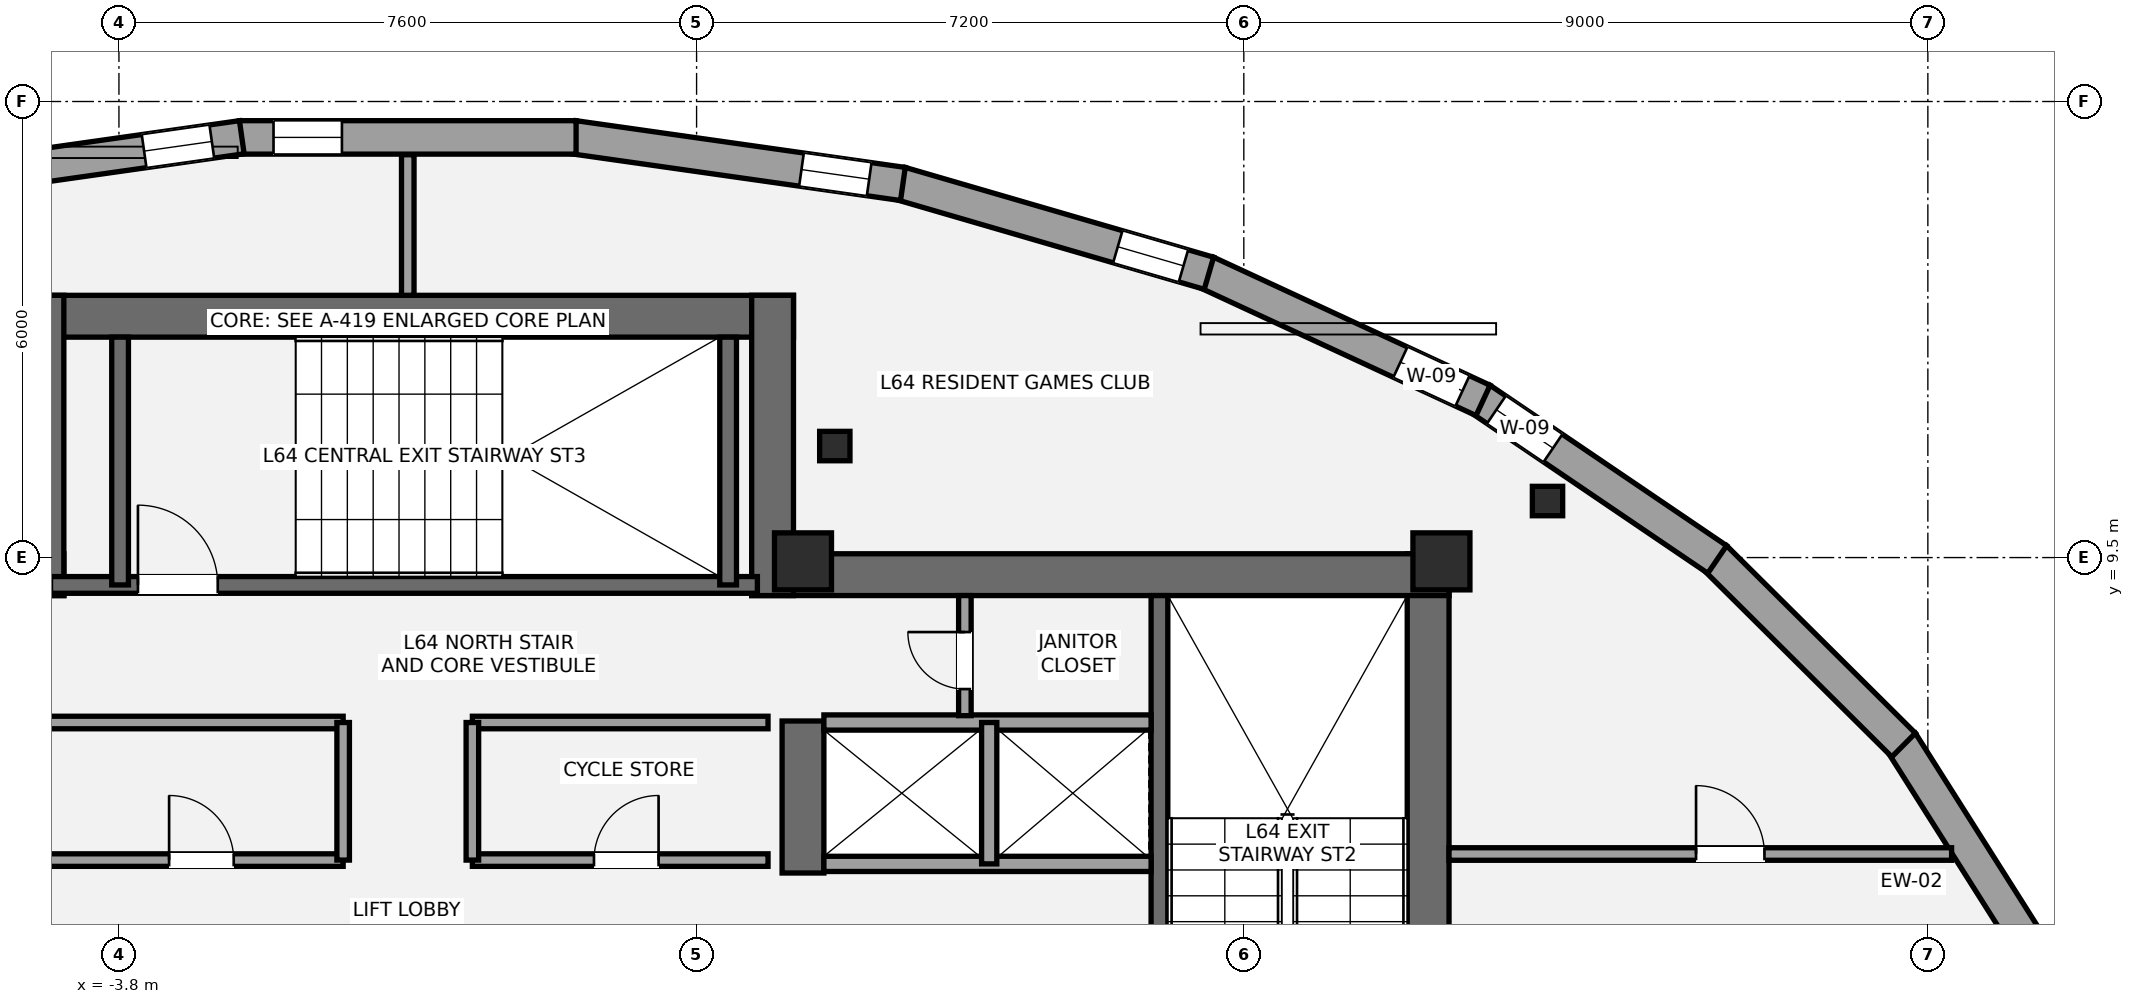
"""IFC4 building model, lengths in metres.
Left out: names, types, materials, properties, quantities, classifications, styles, units other than length and angle.
Written with IfcOpenShell. Run it as: python <this file> out.ifc"""

import sys

from ifc_helpers import new_model, si_unit, direction, frame, frame_2d, origin, origin_2d, place, context, subcontext, project, spatial, rectangle, i_section, extrude, element, fill, save


model = new_model("IFC4")
c1 = context("Model", 3, precision=1e-05, world=origin(), true_north=direction((0.0, 1.0)))
c2 = subcontext(c1, "Body", "Model", "MODEL_VIEW")
j1 = project(units=[si_unit("LENGTHUNIT", "METRE"), si_unit("PLANEANGLEUNIT", "RADIAN")], contexts=[c1])
p1 = place(None, origin())
s1 = spatial("IfcSite", under=j1, at=p1, CompositionType="ELEMENT")
p2 = place(p1, origin())
s2 = spatial("IfcBuilding", under=s1, at=p2, CompositionType="ELEMENT")
p3 = place(p2, frame((0.0, 0.0, 228.9)))
s3 = spatial("IfcBuildingStorey", under=s2, at=p3, CompositionType="ELEMENT", Elevation=228.9)
p4 = place(p3, frame((-13.7, 9.275, 0.0), z_axis=(0.0, 0.0, 1.0), x_axis=(1.0, 0.0, 0.0)))
e1 = element("IfcWall", 1, at=p4, inside=s3, PredefinedType="SHEAR", context=c2, shape_type="SweptSolid", body=[
    extrude(rectangle(XDim=9.175, YDim=0.55, at=frame_2d((4.587, 0.0))), origin(), (0.0, 0.0, 1.0), 3.15),
])
p5 = place(p3, frame((13.425, 1.3, 0.0), z_axis=(0.0, 0.0, 1.0), x_axis=(0.0, 1.0, 0.0)))
e2 = element("IfcWall", 2, at=p5, inside=s3, PredefinedType="SHEAR", context=c2, shape_type="SweptSolid", body=[
    extrude(rectangle(XDim=8.25, YDim=0.55, at=frame_2d((4.125, 0.0))), origin(), (0.0, 0.0, 1.0), 3.15),
])
p6 = place(p3, frame((4.525, 9.275, 0.0), z_axis=(0.0, 0.0, 1.0), x_axis=(1.0, 0.0, 0.0)))
e3 = element("IfcWall", 3, at=p6, inside=s3, PredefinedType="SHEAR", context=c2, shape_type="SweptSolid", body=[
    extrude(rectangle(XDim=9.175, YDim=0.55, at=frame_2d((4.587, 0.0))), origin(), (0.0, 0.0, 1.0), 3.15),
])
p7 = place(p3, frame((5.2, 5.35, 0.0), z_axis=(0.0, 0.0, 1.0), x_axis=(0.0, 1.0, 0.0)))
e4 = element("IfcWall", 4, at=p7, inside=s3, PredefinedType="SHEAR", context=c2, shape_type="SweptSolid", body=[
    extrude(rectangle(XDim=2.0, YDim=0.55, at=frame_2d((1.0, 0.0))), origin(), (0.0, 0.0, 1.0), 3.15),
])
p8 = place(p3, frame((9.89, 1.85, 0.0), z_axis=(0.0, 0.0, 1.0), x_axis=(0.0, 1.0, 0.0)))
e5 = element("IfcWall", 5, at=p8, inside=s3, PredefinedType="SHEAR", context=c2, shape_type="SweptSolid", body=[
    extrude(rectangle(XDim=7.15, YDim=0.22, at=frame_2d((3.575, 0.0))), origin(), (0.0, 0.0, 1.0), 3.15),
])
p9 = place(p3, frame((-5.075, 12.675, 0.0), z_axis=(0.0, 0.0, 1.0), x_axis=(1.0, 0.0, 0.0)))
e6 = element("IfcWall", 6, at=p9, inside=s3, PredefinedType="SHEAR", context=c2, shape_type="SweptSolid", body=[
    extrude(rectangle(XDim=10.15, YDim=0.55, at=frame_2d((5.075, 0.0))), origin(), (0.0, 0.0, 1.0), 3.15),
])
for number, where, z_axis, x_axis in (
    (7, (-4.8, 9.0, 0.0), (0.0, 0.0, 1.0), (0.0, 1.0, 0.0)),
    (8, (4.8, 9.0, 0.0), (0.0, 0.0, 1.0), (0.0, 1.0, 0.0)),
):
    element("IfcWall", number, at=place(p3, frame(where, z_axis=z_axis, x_axis=x_axis)), inside=s3, PredefinedType="SHEAR", context=c2, shape_type="SweptSolid", body=[
        extrude(rectangle(XDim=3.95, YDim=0.55, at=frame_2d((1.975, 0.0))), origin(), (0.0, 0.0, 1.0), 3.15),
    ])
p10 = place(p3, frame((-4.7, 9.14, 0.0), z_axis=(0.0, 0.0, 1.0), x_axis=(1.0, 0.0, 0.0)))
e9 = element("IfcWall", 9, at=p10, inside=s3, PredefinedType="SHEAR", context=c2, shape_type="SweptSolid", body=[
    extrude(rectangle(XDim=9.3, YDim=0.22, at=frame_2d((4.65, 0.0))), origin(), (0.0, 0.0, 1.0), 3.15),
])
p11 = place(p10, frame((1.15, 0.0, 0.0)))
e10 = element("IfcOpeningElement", 10, at=p11, cuts=e9, PredefinedType="OPENING", context=c2, shape_type="SweptSolid", body=[
    extrude(rectangle(XDim=1.05, YDim=2.15, at=frame_2d((0.525, 1.075))), frame((0.0, 0.12, 0.0), z_axis=(0.0, -1.0, 0.0), x_axis=(1.0, 0.0, 0.0)), (0.0, 0.0, 1.0), 0.24),
])
for number, where, z_axis, x_axis in (
    (11, (-3.785, 9.14, 0.0), (0.0, 0.0, 1.0), (0.0, 1.0, 0.0)),
    (12, (4.215, 9.14, 0.0), (0.0, 0.0, 1.0), (0.0, 1.0, 0.0)),
):
    element("IfcWall", number, at=place(p3, frame(where, z_axis=z_axis, x_axis=x_axis)), inside=s3, PredefinedType="SHEAR", context=c2, shape_type="SweptSolid", body=[
        extrude(rectangle(XDim=3.26, YDim=0.22, at=frame_2d((1.63, 0.0))), origin(), (0.0, 0.0, 1.0), 3.15),
    ])
for number, where, z_axis, x_axis in (
    (13, (5.2, 9.45, 0.0), (0.0, 0.0, 1.0), (1.0, 0.0, 0.0)),
    (14, (13.6, 9.45, 0.0), (0.0, 0.0, 1.0), (1.0, 0.0, 0.0)),
):
    element("IfcColumn", number, at=place(p3, frame(where, z_axis=z_axis, x_axis=x_axis)), inside=s3, PredefinedType="PILASTER", context=c2, shape_type="SweptSolid", body=[
        extrude(rectangle(XDim=0.75, YDim=0.75, at=origin_2d()), origin(), (0.0, 0.0, 1.0), 3.15),
    ])
for number, where, z_axis, x_axis in (
    (15, (14.996, 10.244, 0.0), (0.0, 0.0, 1.0), (1.0, 0.0, 0.0)),
    (16, (5.619, 10.967, 0.0), (0.0, 0.0, 1.0), (1.0, 0.0, 0.0)),
):
    element("IfcColumn", number, at=place(p3, frame(where, z_axis=z_axis, x_axis=x_axis)), inside=s3, PredefinedType="COLUMN", context=c2, shape_type="SweptSolid", body=[
        extrude(i_section(OverallWidth=0.399, OverallDepth=0.387, WebThickness=0.021, FlangeThickness=0.033, at=origin_2d()), origin(), (0.0, 0.0, 1.0), 3.15),
    ])
p12 = place(p3, frame((19.65, 7.073, 0.0), z_axis=(0.0, 0.0, 1.0), x_axis=(0.53485586517, -0.844943313775, 0.0)))
e17 = element("IfcWall", 17, at=p12, inside=s3, PredefinedType="STANDARD", context=c2, shape_type="SweptSolid", body=[
    extrude(rectangle(XDim=3.256, YDim=0.44, at=frame_2d((1.628, 0.0))), origin(), (0.0, 0.0, 1.0), 2.336),
])
p13 = place(p3, frame((17.197, 9.501, 0.0), z_axis=(0.0, 0.0, 1.0), x_axis=(0.709543258305, -0.704661879623, 0.0)))
e18 = element("IfcWall", 18, at=p13, inside=s3, PredefinedType="STANDARD", context=c2, shape_type="SweptSolid", body=[
    extrude(rectangle(XDim=3.501, YDim=0.44, at=frame_2d((1.75, 0.0))), origin(), (0.0, 0.0, 1.0), 2.336),
])
p14 = place(p3, frame((14.117, 11.585, 0.0), z_axis=(0.0, 0.0, 1.0), x_axis=(0.827638454008, -0.561261605178, 0.0)))
e19 = element("IfcWall", 19, at=p14, inside=s3, PredefinedType="STANDARD", context=c2, shape_type="SweptSolid", body=[
    extrude(rectangle(XDim=3.76, YDim=0.44, at=frame_2d((1.88, 0.0))), origin(), (0.0, 0.0, 1.0), 2.336),
])
p15 = place(p14, frame((0.249, 0.0, 0.42)))
e20 = element("IfcOpeningElement", 20, at=p15, cuts=e19, PredefinedType="OPENING", context=c2, shape_type="SweptSolid", body=[
    extrude(rectangle(XDim=0.9, YDim=1.35, at=frame_2d((0.45, 0.675))), frame((0.0, 0.23, 0.0), z_axis=(0.0, -1.0, 0.0), x_axis=(1.0, 0.0, 0.0)), (0.0, 0.0, 1.0), 0.46),
])
p16 = place(p3, frame((10.51, 13.252, 0.0), z_axis=(0.0, 0.0, 1.0), x_axis=(0.907400682183, -0.420266584412, 0.0)))
e21 = element("IfcWall", 21, at=p16, inside=s3, PredefinedType="STANDARD", context=c2, shape_type="SweptSolid", body=[
    extrude(rectangle(XDim=4.009, YDim=0.44, at=frame_2d((2.004, 0.0))), origin(), (0.0, 0.0, 1.0), 2.336),
])
p17 = place(p16, frame((2.81, 0.0, 0.58)))
e22 = element("IfcOpeningElement", 22, at=p17, cuts=e21, PredefinedType="OPENING", context=c2, shape_type="SweptSolid", body=[
    extrude(rectangle(XDim=0.9, YDim=1.35, at=frame_2d((0.45, 0.675))), frame((0.0, 0.23, 0.0), z_axis=(0.0, -1.0, 0.0), x_axis=(1.0, 0.0, 0.0)), (0.0, 0.0, 1.0), 0.46),
])
p18 = place(p3, frame((6.484, 14.422, 0.0), z_axis=(0.0, 0.0, 1.0), x_axis=(0.960138362531, -0.279525177393, 0.0)))
e23 = element("IfcWall", 23, at=p18, inside=s3, PredefinedType="STANDARD", context=c2, shape_type="SweptSolid", body=[
    extrude(rectangle(XDim=4.226, YDim=0.44, at=frame_2d((2.113, 0.0))), origin(), (0.0, 0.0, 1.0), 2.336),
])
p19 = place(p18, frame((2.977, 0.0, 0.58)))
e24 = element("IfcOpeningElement", 24, at=p19, cuts=e23, PredefinedType="OPENING", context=c2, shape_type="SweptSolid", body=[
    extrude(rectangle(XDim=0.9, YDim=1.35, at=frame_2d((0.45, 0.675))), frame((0.0, 0.23, 0.0), z_axis=(0.0, -1.0, 0.0), x_axis=(1.0, 0.0, 0.0)), (0.0, 0.0, 1.0), 0.46),
])
p20 = place(p3, frame((2.184, 15.03, 0.0), z_axis=(0.0, 0.0, 1.0), x_axis=(0.990076340622, -0.140530565146, 0.0)))
e25 = element("IfcWall", 25, at=p20, inside=s3, PredefinedType="STANDARD", context=c2, shape_type="SweptSolid", body=[
    extrude(rectangle(XDim=4.375, YDim=0.44, at=frame_2d((2.187, 0.0))), origin(), (0.0, 0.0, 1.0), 2.336),
])
p21 = place(p20, frame((3.027, 0.0, 0.58)))
e26 = element("IfcOpeningElement", 26, at=p21, cuts=e25, PredefinedType="OPENING", context=c2, shape_type="SweptSolid", body=[
    extrude(rectangle(XDim=0.9, YDim=1.35, at=frame_2d((0.45, 0.675))), frame((0.0, 0.23, 0.0), z_axis=(0.0, -1.0, 0.0), x_axis=(1.0, 0.0, 0.0)), (0.0, 0.0, 1.0), 0.46),
])
p22 = place(p3, frame((-2.215, 15.028, 0.0), z_axis=(0.0, 0.0, 1.0), x_axis=(1.0, 0.0, 0.0)))
e27 = element("IfcWall", 27, at=p22, inside=s3, PredefinedType="STANDARD", context=c2, shape_type="SweptSolid", body=[
    extrude(rectangle(XDim=4.429, YDim=0.44, at=frame_2d((2.215, 0.0))), origin(), (0.0, 0.0, 1.0), 2.336),
])
p23 = place(p22, frame((0.448, 0.0, 0.58)))
e28 = element("IfcOpeningElement", 28, at=p23, cuts=e27, PredefinedType="OPENING", context=c2, shape_type="SweptSolid", body=[
    extrude(rectangle(XDim=0.9, YDim=1.35, at=frame_2d((0.45, 0.675))), frame((0.0, 0.23, 0.0), z_axis=(0.0, -1.0, 0.0), x_axis=(1.0, 0.0, 0.0)), (0.0, 0.0, 1.0), 0.46),
])
p24 = place(p3, frame((-6.515, 14.415, 0.0), z_axis=(0.0, 0.0, 1.0), x_axis=(0.990076340622, 0.140530565146, 0.0)))
e29 = element("IfcWall", 29, at=p24, inside=s3, PredefinedType="STANDARD", context=c2, shape_type="SweptSolid", body=[
    extrude(rectangle(XDim=4.375, YDim=0.44, at=frame_2d((2.187, 0.0))), origin(), (0.0, 0.0, 1.0), 2.336),
])
p25 = place(p24, frame((3.076, 0.0, 0.58)))
e30 = element("IfcOpeningElement", 30, at=p25, cuts=e29, PredefinedType="OPENING", context=c2, shape_type="SweptSolid", body=[
    extrude(rectangle(XDim=0.9, YDim=1.35, at=frame_2d((0.45, 0.675))), frame((0.0, 0.23, 0.0), z_axis=(0.0, -1.0, 0.0), x_axis=(1.0, 0.0, 0.0)), (0.0, 0.0, 1.0), 0.46),
])
for number, where, z_axis, x_axis in (
    (31, (5.475, 5.47, 0.0), (0.0, 0.0, 1.0), (1.0, 0.0, 0.0)),
    (32, (5.475, 7.33, 0.0), (0.0, 0.0, 1.0), (1.0, 0.0, 0.0)),
):
    element("IfcWall", number, at=place(p3, frame(where, z_axis=z_axis, x_axis=x_axis)), inside=s3, PredefinedType="SOLIDWALL", context=c2, shape_type="SweptSolid", body=[
        extrude(rectangle(XDim=4.305, YDim=0.2, at=frame_2d((2.152, 0.0))), origin(), (0.0, 0.0, 1.0), 2.97),
    ])
p26 = place(p3, frame((7.65, 5.47, 0.0), z_axis=(0.0, 0.0, 1.0), x_axis=(0.0, 1.0, 0.0)))
e33 = element("IfcWall", 33, at=p26, inside=s3, PredefinedType="SOLIDWALL", context=c2, shape_type="SweptSolid", body=[
    extrude(rectangle(XDim=1.86, YDim=0.2, at=frame_2d((0.93, 0.0))), origin(), (0.0, 0.0, 1.0), 2.97),
])
p27 = place(p3, frame((-4.74, 5.52, 0.0), z_axis=(0.0, 0.0, 1.0), x_axis=(1.0, 0.0, 0.0)))
e34 = element("IfcWall", 34, at=p27, inside=s3, PredefinedType="PARTITIONING", context=c2, shape_type="SweptSolid", body=[
    extrude(rectangle(XDim=3.89, YDim=0.165, at=frame_2d((1.945, 0.0))), origin(), (0.0, 0.0, 1.0), 2.97),
])
p28 = place(p27, frame((1.6, 0.0, 0.0)))
e35 = element("IfcOpeningElement", 35, at=p28, cuts=e34, PredefinedType="OPENING", context=c2, shape_type="SweptSolid", body=[
    extrude(rectangle(XDim=0.85, YDim=2.1, at=frame_2d((0.425, 1.05))), frame((0.0, 0.093, 0.0), z_axis=(0.0, -1.0, 0.0), x_axis=(1.0, 0.0, 0.0)), (0.0, 0.0, 1.0), 0.185),
])
p29 = place(p3, frame((-4.74, 7.33, 0.0), z_axis=(0.0, 0.0, 1.0), x_axis=(1.0, 0.0, 0.0)))
e36 = element("IfcWall", 36, at=p29, inside=s3, PredefinedType="PARTITIONING", context=c2, shape_type="SweptSolid", body=[
    extrude(rectangle(XDim=3.89, YDim=0.165, at=frame_2d((1.945, 0.0))), origin(), (0.0, 0.0, 1.0), 2.97),
])
p30 = place(p3, frame((-0.85, 5.52, 0.0), z_axis=(0.0, 0.0, 1.0), x_axis=(0.0, 1.0, 0.0)))
e37 = element("IfcWall", 37, at=p30, inside=s3, PredefinedType="PARTITIONING", context=c2, shape_type="SweptSolid", body=[
    extrude(rectangle(XDim=1.81, YDim=0.165, at=frame_2d((0.905, 0.0))), origin(), (0.0, 0.0, 1.0), 2.97),
])
p31 = place(p3, frame((0.85, 5.52, 0.0), z_axis=(0.0, 0.0, 1.0), x_axis=(1.0, 0.0, 0.0)))
e38 = element("IfcWall", 38, at=p31, inside=s3, PredefinedType="PARTITIONING", context=c2, shape_type="SweptSolid", body=[
    extrude(rectangle(XDim=3.89, YDim=0.165, at=frame_2d((1.945, 0.0))), origin(), (0.0, 0.0, 1.0), 2.97),
])
p32 = place(p31, frame((1.6, 0.0, 0.0)))
e39 = element("IfcOpeningElement", 39, at=p32, cuts=e38, PredefinedType="OPENING", context=c2, shape_type="SweptSolid", body=[
    extrude(rectangle(XDim=0.85, YDim=2.1, at=frame_2d((0.425, 1.05))), frame((0.0, 0.093, 0.0), z_axis=(0.0, -1.0, 0.0), x_axis=(1.0, 0.0, 0.0)), (0.0, 0.0, 1.0), 0.185),
])
p33 = place(p3, frame((0.85, 7.33, 0.0), z_axis=(0.0, 0.0, 1.0), x_axis=(1.0, 0.0, 0.0)))
e40 = element("IfcWall", 40, at=p33, inside=s3, PredefinedType="PARTITIONING", context=c2, shape_type="SweptSolid", body=[
    extrude(rectangle(XDim=3.89, YDim=0.165, at=frame_2d((1.945, 0.0))), origin(), (0.0, 0.0, 1.0), 2.97),
])
p34 = place(p3, frame((0.85, 5.52, 0.0), z_axis=(0.0, 0.0, 1.0), x_axis=(0.0, 1.0, 0.0)))
e41 = element("IfcWall", 41, at=p34, inside=s3, PredefinedType="PARTITIONING", context=c2, shape_type="SweptSolid", body=[
    extrude(rectangle(XDim=1.81, YDim=0.165, at=frame_2d((0.905, 0.0))), origin(), (0.0, 0.0, 1.0), 2.97),
])
p35 = place(p3, frame((7.33, 7.42, 0.0), z_axis=(0.0, 0.0, 1.0), x_axis=(0.0, 1.0, 0.0)))
e42 = element("IfcWall", 42, at=p35, inside=s3, PredefinedType="PARTITIONING", context=c2, shape_type="SweptSolid", body=[
    extrude(rectangle(XDim=1.58, YDim=0.165, at=frame_2d((0.79, 0.0))), origin(), (0.0, 0.0, 1.0), 2.97),
])
p36 = place(p35, frame((0.35, 0.0, 0.0)))
e43 = element("IfcOpeningElement", 43, at=p36, cuts=e42, PredefinedType="OPENING", context=c2, shape_type="SweptSolid", body=[
    extrude(rectangle(XDim=0.75, YDim=2.1, at=frame_2d((0.375, 1.05))), frame((0.0, 0.093, 0.0), z_axis=(0.0, -1.0, 0.0), x_axis=(1.0, 0.0, 0.0)), (0.0, 0.0, 1.0), 0.185),
])
p37 = place(p3, frame((0.0, 12.95, 0.0), z_axis=(0.0, 0.0, 1.0), x_axis=(0.0, 1.0, 0.0)))
e44 = element("IfcWall", 44, at=p37, inside=s3, PredefinedType="PARTITIONING", context=c2, shape_type="SweptSolid", body=[
    extrude(rectangle(XDim=1.85, YDim=0.165, at=frame_2d((0.925, 0.0))), origin(), (0.0, 0.0, 1.0), 2.97),
])
p38 = place(p3, frame((13.7, 5.6, 0.0), z_axis=(0.0, 0.0, 1.0), x_axis=(1.0, 0.0, 0.0)))
e45 = element("IfcWall", 45, at=p38, inside=s3, PredefinedType="PARTITIONING", context=c2, shape_type="SweptSolid", body=[
    extrude(rectangle(XDim=6.612, YDim=0.165, at=frame_2d((3.306, 0.0))), origin(), (0.0, 0.0, 1.0), 2.423),
])
p39 = place(p38, frame((3.25, 0.0, 0.0)))
e46 = element("IfcOpeningElement", 46, at=p39, cuts=e45, PredefinedType="OPENING", context=c2, shape_type="SweptSolid", body=[
    extrude(rectangle(XDim=0.9, YDim=2.1, at=frame_2d((0.45, 1.05))), frame((0.0, 0.093, 0.0), z_axis=(0.0, -1.0, 0.0), x_axis=(1.0, 0.0, 0.0)), (0.0, 0.0, 1.0), 0.185),
])
p40 = place(p15, origin())
e47 = element("IfcWindow", 47, at=p40, inside=s3, PartitioningType="SINGLE_PANEL", PredefinedType="WINDOW", context=c2, shape_type="SweptSolid", body=[
    extrude(rectangle(XDim=0.9, YDim=1.35, at=frame_2d((0.45, 0.675))), frame((0.0, -0.01, 0.0), z_axis=(0.0, -1.0, 0.0), x_axis=(1.0, 0.0, 0.0)), (0.0, 0.0, 1.0), 0.06),
])
fill(e20, e47)
p41 = place(p17, origin())
e48 = element("IfcWindow", 48, at=p41, inside=s3, PartitioningType="SINGLE_PANEL", PredefinedType="WINDOW", context=c2, shape_type="SweptSolid", body=[
    extrude(rectangle(XDim=0.9, YDim=1.35, at=frame_2d((0.45, 0.675))), frame((0.0, -0.01, 0.0), z_axis=(0.0, -1.0, 0.0), x_axis=(1.0, 0.0, 0.0)), (0.0, 0.0, 1.0), 0.06),
])
fill(e22, e48)
p42 = place(p19, origin())
e49 = element("IfcWindow", 49, at=p42, inside=s3, PartitioningType="SINGLE_PANEL", PredefinedType="WINDOW", context=c2, shape_type="SweptSolid", body=[
    extrude(rectangle(XDim=0.9, YDim=1.35, at=frame_2d((0.45, 0.675))), frame((0.0, -0.01, 0.0), z_axis=(0.0, -1.0, 0.0), x_axis=(1.0, 0.0, 0.0)), (0.0, 0.0, 1.0), 0.06),
])
fill(e24, e49)
p43 = place(p21, origin())
e50 = element("IfcWindow", 50, at=p43, inside=s3, PartitioningType="SINGLE_PANEL", PredefinedType="WINDOW", context=c2, shape_type="SweptSolid", body=[
    extrude(rectangle(XDim=0.9, YDim=1.35, at=frame_2d((0.45, 0.675))), frame((0.0, -0.01, 0.0), z_axis=(0.0, -1.0, 0.0), x_axis=(1.0, 0.0, 0.0)), (0.0, 0.0, 1.0), 0.06),
])
fill(e26, e50)
p44 = place(p23, origin())
e51 = element("IfcWindow", 51, at=p44, inside=s3, PartitioningType="SINGLE_PANEL", PredefinedType="WINDOW", context=c2, shape_type="SweptSolid", body=[
    extrude(rectangle(XDim=0.9, YDim=1.35, at=frame_2d((0.45, 0.675))), frame((0.0, -0.01, 0.0), z_axis=(0.0, -1.0, 0.0), x_axis=(1.0, 0.0, 0.0)), (0.0, 0.0, 1.0), 0.06),
])
fill(e28, e51)
p45 = place(p25, origin())
e52 = element("IfcWindow", 52, at=p45, inside=s3, PartitioningType="SINGLE_PANEL", PredefinedType="WINDOW", context=c2, shape_type="SweptSolid", body=[
    extrude(rectangle(XDim=0.9, YDim=1.35, at=frame_2d((0.45, 0.675))), frame((0.0, -0.01, 0.0), z_axis=(0.0, -1.0, 0.0), x_axis=(1.0, 0.0, 0.0)), (0.0, 0.0, 1.0), 0.06),
])
fill(e30, e52)
p46 = place(p11, origin())
e53 = element("IfcDoor", 53, at=p46, inside=s3, OperationType="SINGLE_SWING_LEFT", PredefinedType="DOOR", context=c2, shape_type="SweptSolid", body=[
    extrude(rectangle(XDim=1.05, YDim=2.15, at=frame_2d((0.525, 1.075))), frame((0.0, 0.025, 0.0), z_axis=(0.0, -1.0, 0.0), x_axis=(1.0, 0.0, 0.0)), (0.0, 0.0, 1.0), 0.05),
])
fill(e10, e53)
p47 = place(p28, origin())
e54 = element("IfcDoor", 54, at=p47, inside=s3, OperationType="SINGLE_SWING_LEFT", PredefinedType="DOOR", context=c2, shape_type="SweptSolid", body=[
    extrude(rectangle(XDim=0.85, YDim=2.1, at=frame_2d((0.425, 1.05))), frame((0.0, 0.025, 0.0), z_axis=(0.0, -1.0, 0.0), x_axis=(1.0, 0.0, 0.0)), (0.0, 0.0, 1.0), 0.05),
])
fill(e35, e54)
p48 = place(p32, origin())
e55 = element("IfcDoor", 55, at=p48, inside=s3, OperationType="SINGLE_SWING_RIGHT", PredefinedType="DOOR", context=c2, shape_type="SweptSolid", body=[
    extrude(rectangle(XDim=0.85, YDim=2.1, at=frame_2d((0.425, 1.05))), frame((0.0, 0.025, 0.0), z_axis=(0.0, -1.0, 0.0), x_axis=(1.0, 0.0, 0.0)), (0.0, 0.0, 1.0), 0.05),
])
fill(e39, e55)
p49 = place(p36, origin())
e56 = element("IfcDoor", 56, at=p49, inside=s3, OperationType="SINGLE_SWING_RIGHT", PredefinedType="DOOR", context=c2, shape_type="SweptSolid", body=[
    extrude(rectangle(XDim=0.75, YDim=2.1, at=frame_2d((0.375, 1.05))), frame((0.0, 0.025, 0.0), z_axis=(0.0, -1.0, 0.0), x_axis=(1.0, 0.0, 0.0)), (0.0, 0.0, 1.0), 0.05),
])
fill(e43, e56)
p50 = place(p39, origin())
e57 = element("IfcDoor", 57, at=p50, inside=s3, OperationType="SINGLE_SWING_LEFT", PredefinedType="DOOR", context=c2, shape_type="SweptSolid", body=[
    extrude(rectangle(XDim=0.9, YDim=2.1, at=frame_2d((0.45, 1.05))), frame((0.0, 0.025, 0.0), z_axis=(0.0, -1.0, 0.0), x_axis=(1.0, 0.0, 0.0)), (0.0, 0.0, 1.0), 0.05),
])
fill(e46, e57)
save(model, sys.argv[1])
